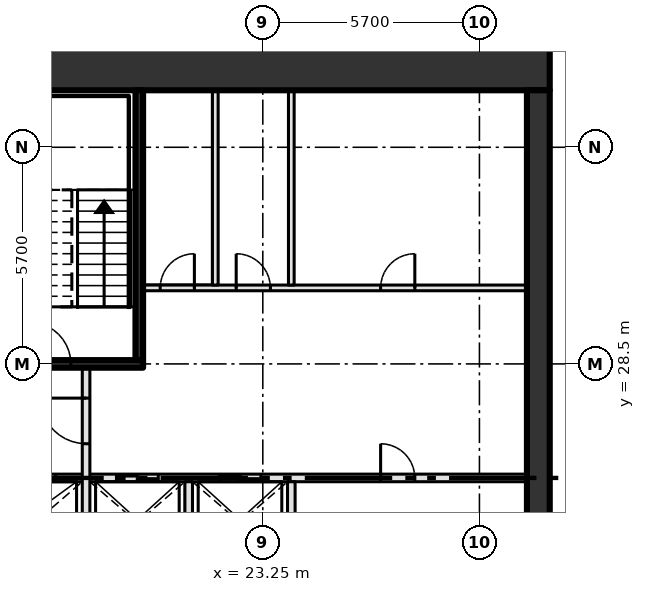
"""IFC4 building model, lengths in metres.
Left out: names, types, materials, properties, quantities, classifications, styles, units other than length and angle.
Written with IfcOpenShell. Run it as: python <this file> out.ifc"""

import sys

from ifc_helpers import new_model, si_unit, direction, frame, frame_2d, origin, place, context, subcontext, project, spatial, rectangle, extrude, element, fill, save


model = new_model("IFC4")
c1 = context("Model", 3, precision=1e-05, world=origin(), true_north=direction((0.0, 1.0)))
c2 = subcontext(c1, "Body", "Model", "MODEL_VIEW")
j1 = project(units=[si_unit("LENGTHUNIT", "METRE"), si_unit("PLANEANGLEUNIT", "RADIAN")], contexts=[c1])
p1 = place(None, origin())
s1 = spatial("IfcSite", under=j1, at=p1, CompositionType="ELEMENT")
p2 = place(p1, origin())
s2 = spatial("IfcBuilding", under=s1, at=p2, CompositionType="ELEMENT")
p3 = place(p2, frame((0.0, 0.0, 323.4)))
s3 = spatial("IfcBuildingStorey", under=s2, at=p3, CompositionType="ELEMENT", Elevation=323.4)
p4 = place(p3, frame((8.0, 36.3, -0.3), z_axis=(0.0, 0.0, 1.0), x_axis=(1.0, 0.0, 0.0)))
e1 = element("IfcWall", 1, at=p4, inside=s3, PredefinedType="SHEAR", context=c2, shape_type="SweptSolid", body=[
    extrude(rectangle(XDim=22.8, YDim=1.2, at=frame_2d((11.4, 0.0))), origin(), (0.0, 0.0, 1.0), 4.2),
])
p5 = place(p4, frame((2.3, 0.0, 0.3)))
e2 = element("IfcOpeningElement", 2, at=p5, cuts=e1, PredefinedType="OPENING", context=c2, shape_type="SweptSolid", body=[
    extrude(rectangle(XDim=1.8, YDim=2.1, at=frame_2d((0.9, 1.05))), frame((0.0, 0.61, 0.0), z_axis=(0.0, -1.0, 0.0), x_axis=(1.0, 0.0, 0.0)), (0.0, 0.0, 1.0), 1.22),
])
p6 = place(p3, frame((30.5, 14.7, -0.3), z_axis=(0.0, 0.0, 1.0), x_axis=(0.0, 1.0, 0.0)))
e3 = element("IfcWall", 3, at=p6, inside=s3, PredefinedType="SHEAR", context=c2, shape_type="SweptSolid", body=[
    extrude(rectangle(XDim=21.0, YDim=0.6, at=frame_2d((10.5, 0.0))), origin(), (0.0, 0.0, 1.0), 4.2),
])
p7 = place(p3, frame((13.35, 25.5, 0.0), z_axis=(0.0, 0.0, 1.0), x_axis=(1.0, 0.0, 0.0)))
e4 = element("IfcWall", 4, at=p7, inside=s3, PredefinedType="SOLIDWALL", context=c2, shape_type="SweptSolid", body=[
    extrude(rectangle(XDim=16.85, YDim=0.2, at=frame_2d((8.425, 0.0))), origin(), (0.0, 0.0, 1.0), 3.9),
])
p8 = place(p7, frame((0.65, 0.0, 0.0)))
e5 = element("IfcOpeningElement", 5, at=p8, cuts=e4, PredefinedType="OPENING", context=c2, shape_type="SweptSolid", body=[
    extrude(rectangle(XDim=1.1, YDim=2.1, at=frame_2d((0.55, 1.05))), frame((0.0, 0.11, 0.0), z_axis=(0.0, -1.0, 0.0), x_axis=(1.0, 0.0, 0.0)), (0.0, 0.0, 1.0), 0.22),
])
p9 = place(p7, frame((3.35, 0.0, 0.0)))
e6 = element("IfcOpeningElement", 6, at=p9, cuts=e4, PredefinedType="OPENING", context=c2, shape_type="SweptSolid", body=[
    extrude(rectangle(XDim=1.1, YDim=2.1, at=frame_2d((0.55, 1.05))), frame((0.0, 0.11, 0.0), z_axis=(0.0, -1.0, 0.0), x_axis=(1.0, 0.0, 0.0)), (0.0, 0.0, 1.0), 0.22),
])
p10 = place(p7, frame((6.05, 0.0, 0.0)))
e7 = element("IfcOpeningElement", 7, at=p10, cuts=e4, PredefinedType="OPENING", context=c2, shape_type="SweptSolid", body=[
    extrude(rectangle(XDim=1.1, YDim=2.1, at=frame_2d((0.55, 1.05))), frame((0.0, 0.11, 0.0), z_axis=(0.0, -1.0, 0.0), x_axis=(1.0, 0.0, 0.0)), (0.0, 0.0, 1.0), 0.22),
])
p11 = place(p7, frame((8.75, 0.0, 0.0)))
e8 = element("IfcOpeningElement", 8, at=p11, cuts=e4, PredefinedType="OPENING", context=c2, shape_type="SweptSolid", body=[
    extrude(rectangle(XDim=1.1, YDim=2.1, at=frame_2d((0.55, 1.05))), frame((0.0, 0.11, 0.0), z_axis=(0.0, -1.0, 0.0), x_axis=(1.0, 0.0, 0.0)), (0.0, 0.0, 1.0), 0.22),
])
p12 = place(p7, frame((13.0, 0.0, 0.0)))
e9 = element("IfcOpeningElement", 9, at=p12, cuts=e4, PredefinedType="OPENING", context=c2, shape_type="SweptSolid", body=[
    extrude(rectangle(XDim=0.9, YDim=2.1, at=frame_2d((0.45, 1.05))), frame((0.0, 0.11, 0.0), z_axis=(0.0, -1.0, 0.0), x_axis=(1.0, 0.0, 0.0)), (0.0, 0.0, 1.0), 0.22),
])
p13 = place(p3, frame((13.35, 28.5, 0.0), z_axis=(0.0, 0.0, 1.0), x_axis=(1.0, 0.0, 0.0)))
e10 = element("IfcWall", 10, at=p13, inside=s3, PredefinedType="SOLIDWALL", context=c2, shape_type="SweptSolid", body=[
    extrude(rectangle(XDim=6.75, YDim=0.2, at=frame_2d((3.375, 0.0))), origin(), (0.0, 0.0, 1.0), 3.9),
])
p14 = place(p13, frame((0.95, 0.0, 0.0)))
e11 = element("IfcOpeningElement", 11, at=p14, cuts=e10, PredefinedType="OPENING", context=c2, shape_type="SweptSolid", body=[
    extrude(rectangle(XDim=1.2, YDim=2.1, at=frame_2d((0.6, 1.05))), frame((0.0, 0.11, 0.0), z_axis=(0.0, -1.0, 0.0), x_axis=(1.0, 0.0, 0.0)), (0.0, 0.0, 1.0), 0.22),
])
p15 = place(p13, frame((3.75, 0.0, 0.0)))
e12 = element("IfcOpeningElement", 12, at=p15, cuts=e10, PredefinedType="OPENING", context=c2, shape_type="SweptSolid", body=[
    extrude(rectangle(XDim=1.1, YDim=2.1, at=frame_2d((0.55, 1.05))), frame((0.0, 0.11, 0.0), z_axis=(0.0, -1.0, 0.0), x_axis=(1.0, 0.0, 0.0)), (0.0, 0.0, 1.0), 0.22),
])
p16 = place(p3, frame((20.1, 30.5, 0.0), z_axis=(0.0, 0.0, 1.0), x_axis=(1.0, 0.0, 0.0)))
e13 = element("IfcWall", 13, at=p16, inside=s3, PredefinedType="PARTITIONING", context=c2, shape_type="SweptSolid", body=[
    extrude(rectangle(XDim=10.1, YDim=0.15, at=frame_2d((5.05, 0.0))), origin(), (0.0, 0.0, 1.0), 3.9),
])
p17 = place(p16, frame((0.45, 0.0, 0.0)))
e14 = element("IfcOpeningElement", 14, at=p17, cuts=e13, PredefinedType="OPENING", context=c2, shape_type="SweptSolid", body=[
    extrude(rectangle(XDim=0.9, YDim=2.1, at=frame_2d((0.45, 1.05))), frame((0.0, 0.085, 0.0), z_axis=(0.0, -1.0, 0.0), x_axis=(1.0, 0.0, 0.0)), (0.0, 0.0, 1.0), 0.17),
])
p18 = place(p16, frame((2.45, 0.0, 0.0)))
e15 = element("IfcOpeningElement", 15, at=p18, cuts=e13, PredefinedType="OPENING", context=c2, shape_type="SweptSolid", body=[
    extrude(rectangle(XDim=0.9, YDim=2.1, at=frame_2d((0.45, 1.05))), frame((0.0, 0.085, 0.0), z_axis=(0.0, -1.0, 0.0), x_axis=(1.0, 0.0, 0.0)), (0.0, 0.0, 1.0), 0.17),
])
p19 = place(p16, frame((6.25, 0.0, 0.0)))
e16 = element("IfcOpeningElement", 16, at=p19, cuts=e13, PredefinedType="OPENING", context=c2, shape_type="SweptSolid", body=[
    extrude(rectangle(XDim=0.9, YDim=2.1, at=frame_2d((0.45, 1.05))), frame((0.0, 0.085, 0.0), z_axis=(0.0, -1.0, 0.0), x_axis=(1.0, 0.0, 0.0)), (0.0, 0.0, 1.0), 0.17),
])
p20 = place(p3, frame((18.6, 23.25, 0.0), z_axis=(0.0, 0.0, 1.0), x_axis=(0.0, 1.0, 0.0)))
e17 = element("IfcWall", 17, at=p20, inside=s3, PredefinedType="SOLIDWALL", context=c2, shape_type="SweptSolid", body=[
    extrude(rectangle(XDim=5.15, YDim=0.2, at=frame_2d((2.575, 0.0))), origin(), (0.0, 0.0, 1.0), 3.9),
])
p21 = place(p20, frame((3.15, 0.0, 0.0)))
e18 = element("IfcOpeningElement", 18, at=p21, cuts=e17, PredefinedType="OPENING", context=c2, shape_type="SweptSolid", body=[
    extrude(rectangle(XDim=1.2, YDim=2.1, at=frame_2d((0.6, 1.05))), frame((0.0, 0.11, 0.0), z_axis=(0.0, -1.0, 0.0), x_axis=(1.0, 0.0, 0.0)), (0.0, 0.0, 1.0), 0.22),
])
p22 = place(p3, frame((20.0, 28.6, 0.0), z_axis=(0.0, 0.0, 1.0), x_axis=(0.0, 1.0, 0.0)))
e19 = element("IfcWall", 19, at=p22, inside=s3, PredefinedType="SOLIDWALL", context=c2, shape_type="SweptSolid", body=[
    extrude(rectangle(XDim=7.1, YDim=0.2, at=frame_2d((3.55, 0.0))), origin(), (0.0, 0.0, 1.0), 3.9),
])
p23 = place(p3, frame((21.3, 20.775, 0.0), z_axis=(0.0, 0.0, 1.0), x_axis=(0.0, 1.0, 0.0)))
e20 = element("IfcWall", 20, at=p23, inside=s3, PredefinedType="SOLIDWALL", context=c2, shape_type="SweptSolid", body=[
    extrude(rectangle(XDim=4.625, YDim=0.2, at=frame_2d((2.312, 0.0))), origin(), (0.0, 0.0, 1.0), 3.9),
])
p24 = place(p3, frame((22.0, 30.575, 0.0), z_axis=(0.0, 0.0, 1.0), x_axis=(0.0, 1.0, 0.0)))
e21 = element("IfcWall", 21, at=p24, inside=s3, PredefinedType="PARTITIONING", context=c2, shape_type="SweptSolid", body=[
    extrude(rectangle(XDim=5.125, YDim=0.15, at=frame_2d((2.562, 0.0))), origin(), (0.0, 0.0, 1.0), 3.9),
])
p25 = place(p3, frame((24.0, 23.25, 0.0), z_axis=(0.0, 0.0, 1.0), x_axis=(0.0, 1.0, 0.0)))
e22 = element("IfcWall", 22, at=p25, inside=s3, PredefinedType="SOLIDWALL", context=c2, shape_type="SweptSolid", body=[
    extrude(rectangle(XDim=2.15, YDim=0.2, at=frame_2d((1.075, 0.0))), origin(), (0.0, 0.0, 1.0), 3.9),
])
p26 = place(p3, frame((24.0, 30.575, 0.0), z_axis=(0.0, 0.0, 1.0), x_axis=(0.0, 1.0, 0.0)))
e23 = element("IfcWall", 23, at=p26, inside=s3, PredefinedType="PARTITIONING", context=c2, shape_type="SweptSolid", body=[
    extrude(rectangle(XDim=5.125, YDim=0.15, at=frame_2d((2.562, 0.0))), origin(), (0.0, 0.0, 1.0), 3.9),
])
p27 = place(p9, origin())
e24 = element("IfcDoor", 24, at=p27, inside=s3, OperationType="SLIDING_TO_LEFT", PredefinedType="DOOR", context=c2, shape_type="SweptSolid", body=[
    extrude(rectangle(XDim=1.1, YDim=2.1, at=frame_2d((0.55, 1.05))), frame((0.0, 0.025, 0.0), z_axis=(0.0, -1.0, 0.0), x_axis=(1.0, 0.0, 0.0)), (0.0, 0.0, 1.0), 0.05),
])
fill(e6, e24)
p28 = place(p10, origin())
e25 = element("IfcDoor", 25, at=p28, inside=s3, OperationType="SLIDING_TO_LEFT", PredefinedType="DOOR", context=c2, shape_type="SweptSolid", body=[
    extrude(rectangle(XDim=1.1, YDim=2.1, at=frame_2d((0.55, 1.05))), frame((0.0, 0.025, 0.0), z_axis=(0.0, -1.0, 0.0), x_axis=(1.0, 0.0, 0.0)), (0.0, 0.0, 1.0), 0.05),
])
fill(e7, e25)
p29 = place(p11, origin())
e26 = element("IfcDoor", 26, at=p29, inside=s3, OperationType="SLIDING_TO_LEFT", PredefinedType="DOOR", context=c2, shape_type="SweptSolid", body=[
    extrude(rectangle(XDim=1.1, YDim=2.1, at=frame_2d((0.55, 1.05))), frame((0.0, 0.025, 0.0), z_axis=(0.0, -1.0, 0.0), x_axis=(1.0, 0.0, 0.0)), (0.0, 0.0, 1.0), 0.05),
])
fill(e8, e26)
p30 = place(p12, origin())
e27 = element("IfcDoor", 27, at=p30, inside=s3, OperationType="SINGLE_SWING_LEFT", PredefinedType="DOOR", context=c2, shape_type="SweptSolid", body=[
    extrude(rectangle(XDim=0.9, YDim=2.1, at=frame_2d((0.45, 1.05))), frame((0.0, 0.025, 0.0), z_axis=(0.0, -1.0, 0.0), x_axis=(1.0, 0.0, 0.0)), (0.0, 0.0, 1.0), 0.05),
])
fill(e9, e27)
p31 = place(p17, origin())
e28 = element("IfcDoor", 28, at=p31, inside=s3, OperationType="SINGLE_SWING_RIGHT", PredefinedType="DOOR", context=c2, shape_type="SweptSolid", body=[
    extrude(rectangle(XDim=0.9, YDim=2.1, at=frame_2d((0.45, 1.05))), frame((0.0, 0.025, 0.0), z_axis=(0.0, -1.0, 0.0), x_axis=(1.0, 0.0, 0.0)), (0.0, 0.0, 1.0), 0.05),
])
fill(e14, e28)
p32 = place(p18, origin())
e29 = element("IfcDoor", 29, at=p32, inside=s3, OperationType="SINGLE_SWING_LEFT", PredefinedType="DOOR", context=c2, shape_type="SweptSolid", body=[
    extrude(rectangle(XDim=0.9, YDim=2.1, at=frame_2d((0.45, 1.05))), frame((0.0, 0.025, 0.0), z_axis=(0.0, -1.0, 0.0), x_axis=(1.0, 0.0, 0.0)), (0.0, 0.0, 1.0), 0.05),
])
fill(e15, e29)
p33 = place(p19, origin())
e30 = element("IfcDoor", 30, at=p33, inside=s3, OperationType="SINGLE_SWING_RIGHT", PredefinedType="DOOR", context=c2, shape_type="SweptSolid", body=[
    extrude(rectangle(XDim=0.9, YDim=2.1, at=frame_2d((0.45, 1.05))), frame((0.0, 0.025, 0.0), z_axis=(0.0, -1.0, 0.0), x_axis=(1.0, 0.0, 0.0)), (0.0, 0.0, 1.0), 0.05),
])
fill(e16, e30)
p34 = place(p15, origin())
e31 = element("IfcDoor", 31, at=p34, inside=s3, OperationType="SINGLE_SWING_LEFT", PredefinedType="DOOR", context=c2, shape_type="SweptSolid", body=[
    extrude(rectangle(XDim=1.1, YDim=2.1, at=frame_2d((0.55, 1.05))), frame((0.0, 0.025, 0.0), z_axis=(0.0, -1.0, 0.0), x_axis=(1.0, 0.0, 0.0)), (0.0, 0.0, 1.0), 0.05),
])
fill(e12, e31)
p35 = place(p21, origin())
e32 = element("IfcDoor", 32, at=p35, inside=s3, OperationType="SINGLE_SWING_RIGHT", PredefinedType="DOOR", context=c2, shape_type="SweptSolid", body=[
    extrude(rectangle(XDim=1.2, YDim=2.1, at=frame_2d((0.6, 1.05))), frame((0.0, 0.025, 0.0), z_axis=(0.0, -1.0, 0.0), x_axis=(1.0, 0.0, 0.0)), (0.0, 0.0, 1.0), 0.05),
])
fill(e18, e32)
save(model, sys.argv[1])
